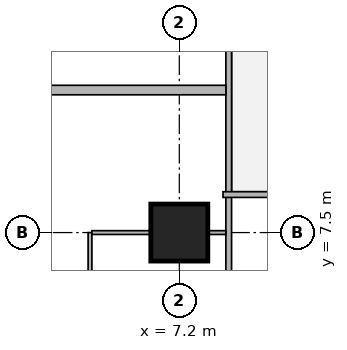
"""IFC4 building model, lengths in metres.
Left out: names, types, materials, properties, quantities, classifications, styles, units other than length and angle.
Written with IfcOpenShell. Run it as: python <this file> out.ifc"""

import sys

from ifc_helpers import new_model, si_unit, direction, frame, frame_2d, origin, origin_2d, place, context, subcontext, project, spatial, rectangle, extrude, element, fill, save


model = new_model("IFC4")
c1 = context("Model", 3, precision=1e-05, world=origin(), true_north=direction((0.0, 1.0)))
c2 = subcontext(c1, "Body", "Model", "MODEL_VIEW")
j1 = project(units=[si_unit("LENGTHUNIT", "METRE"), si_unit("PLANEANGLEUNIT", "RADIAN")], contexts=[c1])
p1 = place(None, origin())
s1 = spatial("IfcSite", under=j1, at=p1, CompositionType="ELEMENT")
p2 = place(p1, origin())
s2 = spatial("IfcBuilding", under=s1, at=p2, CompositionType="ELEMENT")
p3 = place(p2, frame((0.0, 0.0, 158.3)))
s3 = spatial("IfcBuildingStorey", under=s2, at=p3, CompositionType="ELEMENT", Elevation=158.3)
p4 = place(p3, frame((7.2, 7.5, 0.0), z_axis=(0.0, 0.0, 1.0), x_axis=(1.0, 0.0, 0.0)))
e1 = element("IfcColumn", 1, at=p4, inside=s3, PredefinedType="COLUMN", context=c2, shape_type="SweptSolid", body=[
    extrude(rectangle(XDim=1.5, YDim=1.5, at=origin_2d()), origin(), (0.0, 0.0, 1.0), 3.75),
])
p5 = place(p3, frame((8.5, 1.964, 0.0), z_axis=(0.0, 0.0, 1.0), x_axis=(0.0, 1.0, 0.0)))
e2 = element("IfcWall", 2, at=p5, inside=s3, PredefinedType="SOLIDWALL", context=c2, shape_type="SweptSolid", body=[
    extrude(rectangle(XDim=41.097, YDim=0.15, at=frame_2d((20.548, 0.0))), origin(), (0.0, 0.0, 1.0), 3.5),
])
p6 = place(p5, frame((6.911, 0.0, 0.0)))
e3 = element("IfcOpeningElement", 3, at=p6, cuts=e2, PredefinedType="OPENING", context=c2, shape_type="SweptSolid", body=[
    extrude(rectangle(XDim=1.0, YDim=2.1, at=frame_2d((0.5, 1.05))), frame((0.0, 0.085, 0.0), z_axis=(0.0, -1.0, 0.0), x_axis=(1.0, 0.0, 0.0)), (0.0, 0.0, 1.0), 0.17),
])
p7 = place(p5, frame((10.661, 0.0, 0.0)))
e4 = element("IfcOpeningElement", 4, at=p7, cuts=e2, PredefinedType="OPENING", context=c2, shape_type="SweptSolid", body=[
    extrude(rectangle(XDim=1.0, YDim=2.1, at=frame_2d((0.5, 1.05))), frame((0.0, 0.085, 0.0), z_axis=(0.0, -1.0, 0.0), x_axis=(1.0, 0.0, 0.0)), (0.0, 0.0, 1.0), 0.17),
])
p8 = place(p5, frame((25.661, 0.0, 0.0)))
e5 = element("IfcOpeningElement", 5, at=p8, cuts=e2, PredefinedType="OPENING", context=c2, shape_type="SweptSolid", body=[
    extrude(rectangle(XDim=1.0, YDim=2.1, at=frame_2d((0.5, 1.05))), frame((0.0, 0.085, 0.0), z_axis=(0.0, -1.0, 0.0), x_axis=(1.0, 0.0, 0.0)), (0.0, 0.0, 1.0), 0.17),
])
p9 = place(p3, frame((40.053, 8.5, 0.0), z_axis=(0.0, 0.0, 1.0), x_axis=(-1.0, 0.0, 0.0)))
e6 = element("IfcWall", 6, at=p9, inside=s3, PredefinedType="SOLIDWALL", context=c2, shape_type="SweptSolid", body=[
    extrude(rectangle(XDim=31.703, YDim=0.15, at=frame_2d((15.852, 0.0))), origin(), (0.0, 0.0, 1.0), 3.5),
])
p10 = place(p9, frame((28.103, 0.0, 0.0)))
e7 = element("IfcOpeningElement", 7, at=p10, cuts=e6, PredefinedType="OPENING", context=c2, shape_type="SweptSolid", body=[
    extrude(rectangle(XDim=1.0, YDim=2.1, at=frame_2d((0.5, 1.05))), frame((0.0, 0.085, 0.0), z_axis=(0.0, -1.0, 0.0), x_axis=(1.0, 0.0, 0.0)), (0.0, 0.0, 1.0), 0.17),
])
p11 = place(p9, frame((19.754, 0.0, 0.0)))
e8 = element("IfcOpeningElement", 8, at=p11, cuts=e6, PredefinedType="OPENING", context=c2, shape_type="SweptSolid", body=[
    extrude(rectangle(XDim=1.0, YDim=2.1, at=frame_2d((0.5, 1.05))), frame((0.0, 0.085, 0.0), z_axis=(0.0, -1.0, 0.0), x_axis=(1.0, 0.0, 0.0)), (0.0, 0.0, 1.0), 0.17),
])
p12 = place(p9, frame((5.354, 0.0, 0.0)))
e9 = element("IfcOpeningElement", 9, at=p12, cuts=e6, PredefinedType="OPENING", context=c2, shape_type="SweptSolid", body=[
    extrude(rectangle(XDim=1.0, YDim=2.1, at=frame_2d((0.5, 1.05))), frame((0.0, 0.085, 0.0), z_axis=(0.0, -1.0, 0.0), x_axis=(1.0, 0.0, 0.0)), (0.0, 0.0, 1.0), 0.17),
])
p13 = place(p3, frame((4.85, 2.505, 0.0), z_axis=(0.0, 0.0, 1.0), x_axis=(0.0, 1.0, 0.0)))
e10 = element("IfcWall", 10, at=p13, inside=s3, PredefinedType="PARTITIONING", context=c2, shape_type="SweptSolid", body=[
    extrude(rectangle(XDim=4.995, YDim=0.1, at=frame_2d((2.498, 0.0))), origin(), (0.0, 0.0, 1.0), 3.5),
])
p14 = place(p13, frame((3.294, 0.0, 0.0)))
e11 = element("IfcOpeningElement", 11, at=p14, cuts=e10, PredefinedType="OPENING", context=c2, shape_type="SweptSolid", body=[
    extrude(rectangle(XDim=0.9, YDim=2.1, at=frame_2d((0.45, 1.05))), frame((0.0, 0.06, 0.0), z_axis=(0.0, -1.0, 0.0), x_axis=(1.0, 0.0, 0.0)), (0.0, 0.0, 1.0), 0.12),
])
p15 = place(p13, frame((1.019, 0.0, 0.0)))
e12 = element("IfcOpeningElement", 12, at=p15, cuts=e10, PredefinedType="OPENING", context=c2, shape_type="SweptSolid", body=[
    extrude(rectangle(XDim=0.9, YDim=2.1, at=frame_2d((0.45, 1.05))), frame((0.0, 0.06, 0.0), z_axis=(0.0, -1.0, 0.0), x_axis=(1.0, 0.0, 0.0)), (0.0, 0.0, 1.0), 0.12),
])
p16 = place(p3, frame((4.9, 7.5, 0.0), z_axis=(0.0, 0.0, 1.0), x_axis=(1.0, 0.0, 0.0)))
e13 = element("IfcWall", 13, at=p16, inside=s3, PredefinedType="PARTITIONING", context=c2, shape_type="SweptSolid", body=[
    extrude(rectangle(XDim=1.549, YDim=0.1, at=frame_2d((0.774, 0.0))), origin(), (0.0, 0.0, 1.0), 3.5),
])
p17 = place(p3, frame((7.951, 7.5, 0.0), z_axis=(0.0, 0.0, 1.0), x_axis=(1.0, 0.0, 0.0)))
e14 = element("IfcWall", 14, at=p17, inside=s3, PredefinedType="PARTITIONING", context=c2, shape_type="SweptSolid", body=[
    extrude(rectangle(XDim=0.474, YDim=0.1, at=frame_2d((0.237, 0.0))), origin(), (0.0, 0.0, 1.0), 3.5),
])
p18 = place(p3, frame((3.65, 11.25, 0.0), z_axis=(0.0, 0.0, 1.0), x_axis=(1.0, 0.0, 0.0)))
e15 = element("IfcWall", 15, at=p18, inside=s3, PredefinedType="SOLIDWALL", context=c2, shape_type="SweptSolid", body=[
    extrude(rectangle(XDim=4.775, YDim=0.25, at=frame_2d((2.388, 0.0))), origin(), (0.0, 0.0, 1.0), 3.5),
])
p19 = place(p14, origin())
e16 = element("IfcDoor", 16, at=p19, inside=s3, OperationType="SINGLE_SWING_LEFT", PredefinedType="DOOR", context=c2, shape_type="SweptSolid", body=[
    extrude(rectangle(XDim=0.9, YDim=2.1, at=frame_2d((0.45, 1.05))), frame((0.0, 0.025, 0.0), z_axis=(0.0, -1.0, 0.0), x_axis=(1.0, 0.0, 0.0)), (0.0, 0.0, 1.0), 0.05),
])
fill(e11, e16)
p20 = place(p6, origin())
e17 = element("IfcDoor", 17, at=p20, inside=s3, OperationType="SINGLE_SWING_RIGHT", PredefinedType="DOOR", context=c2, shape_type="SweptSolid", body=[
    extrude(rectangle(XDim=1.0, YDim=2.1, at=frame_2d((0.5, 1.05))), frame((0.0, 0.025, 0.0), z_axis=(0.0, -1.0, 0.0), x_axis=(1.0, 0.0, 0.0)), (0.0, 0.0, 1.0), 0.05),
])
fill(e3, e17)
save(model, sys.argv[1])
